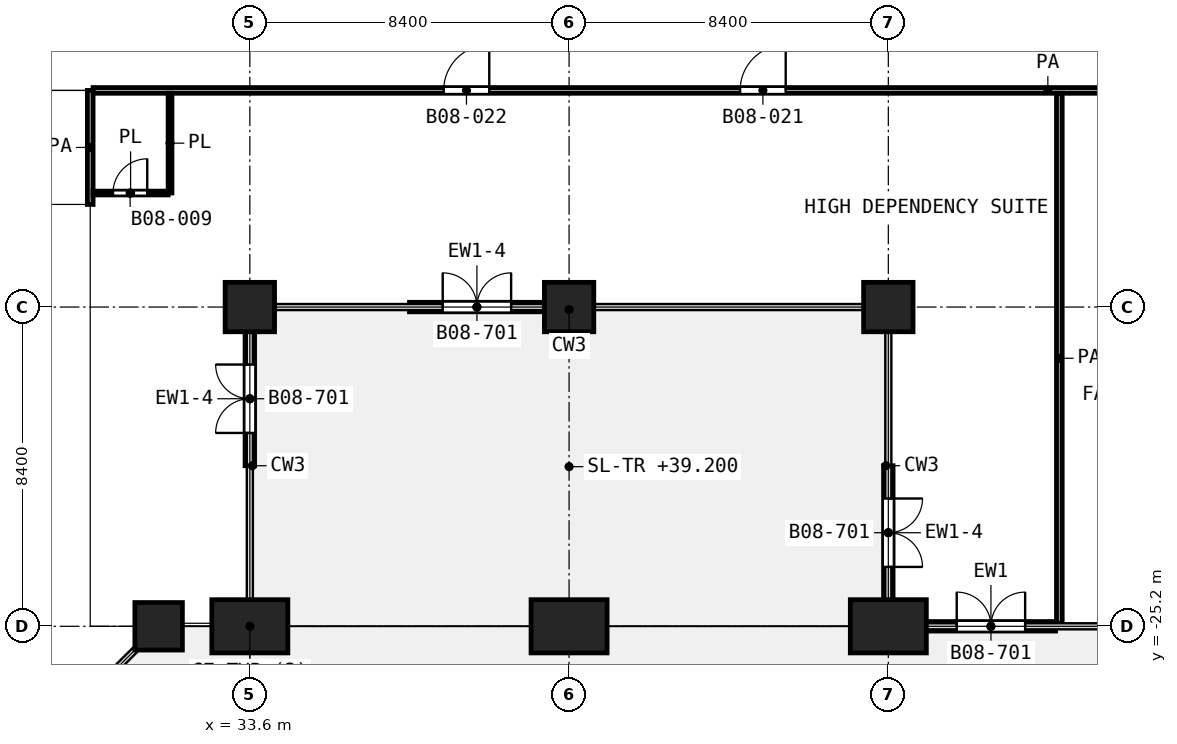
"""IFC4 building model, lengths in metres.
Left out: names, types, materials, properties, quantities, classifications, styles, units other than length and angle.
Written with IfcOpenShell. Run it as: python <this file> out.ifc"""

import sys

from ifc_helpers import new_model, si_unit, direction, frame, frame_2d, origin, origin_2d, place, context, subcontext, project, spatial, rectangle, extrude, element, fill, save


model = new_model("IFC4")
c1 = context("Model", 3, precision=1e-05, world=origin(), true_north=direction((0.0, 1.0)))
c2 = subcontext(c1, "Body", "Model", "MODEL_VIEW")
j1 = project(units=[si_unit("LENGTHUNIT", "METRE"), si_unit("PLANEANGLEUNIT", "RADIAN")], contexts=[c1])
p1 = place(None, origin())
s1 = spatial("IfcSite", under=j1, at=p1, CompositionType="ELEMENT")
p2 = place(p1, origin())
s2 = spatial("IfcBuilding", under=s1, at=p2, CompositionType="ELEMENT")
p3 = place(p2, frame((0.0, 0.0, 39.2)))
s3 = spatial("IfcBuildingStorey", under=s2, at=p3, CompositionType="ELEMENT", Elevation=39.2)
for number, where, z_axis, x_axis in (
    (1, (33.6, -16.8, 0.0), (0.0, 0.0, 1.0), (1.0, 0.0, 0.0)),
    (2, (42.0, -16.8, 0.0), (0.0, 0.0, 1.0), (1.0, 0.0, 0.0)),
    (3, (50.4, -16.8, 0.0), (0.0, 0.0, 1.0), (1.0, 0.0, 0.0)),
):
    element("IfcColumn", number, at=place(p3, frame(where, z_axis=z_axis, x_axis=x_axis)), inside=s3, PredefinedType="COLUMN", context=c2, shape_type="SweptSolid", body=[
        extrude(rectangle(XDim=1.3, YDim=1.3, at=origin_2d()), origin(), (0.0, 0.0, 1.0), 4.2),
    ])
p4 = place(p3, frame((31.2, -25.2, 0.0), z_axis=(0.0, 0.0, 1.0), x_axis=(1.0, 0.0, 0.0)))
e4 = element("IfcColumn", 4, at=p4, inside=s3, PredefinedType="COLUMN", context=c2, shape_type="SweptSolid", body=[
    extrude(rectangle(XDim=1.25, YDim=1.25, at=origin_2d()), origin(), (0.0, 0.0, 1.0), 4.2),
])
for number, where, z_axis, x_axis in (
    (5, (33.6, -25.2, 0.0), (0.0, 0.0, 1.0), (-1.0, 0.0, 0.0)),
    (6, (42.0, -25.2, 0.0), (0.0, 0.0, 1.0), (-1.0, 0.0, 0.0)),
    (7, (50.4, -25.2, 0.0), (0.0, 0.0, 1.0), (-1.0, 0.0, 0.0)),
):
    element("IfcColumn", number, at=place(p3, frame(where, z_axis=z_axis, x_axis=x_axis)), inside=s3, PredefinedType="COLUMN", context=c2, shape_type="SweptSolid", body=[
        extrude(rectangle(XDim=2.0, YDim=1.4, at=origin_2d()), origin(), (0.0, 0.0, 1.0), 4.2),
    ])
p5 = place(p3, frame((33.6, -20.975, 0.0), z_axis=(0.0, 0.0, 1.0), x_axis=(0.0, 1.0, 0.0)))
e8 = element("IfcWall", 8, at=p5, inside=s3, PredefinedType="SOLIDWALL", context=c2, shape_type="SweptSolid", body=[
    extrude(rectangle(XDim=3.525, YDim=0.25, at=frame_2d((1.763, 0.0))), origin(), (0.0, 0.0, 1.0), 3.76),
])
p6 = place(p5, frame((0.863, 0.0, 0.0)))
e9 = element("IfcOpeningElement", 9, at=p6, cuts=e8, PredefinedType="OPENING", context=c2, shape_type="SweptSolid", body=[
    extrude(rectangle(XDim=1.8, YDim=2.1, at=frame_2d((0.9, 1.05))), frame((0.0, 0.135, 0.0), z_axis=(0.0, -1.0, 0.0), x_axis=(1.0, 0.0, 0.0)), (0.0, 0.0, 1.0), 0.27),
])
p7 = place(p3, frame((37.8, -16.8, 0.0), z_axis=(0.0, 0.0, 1.0), x_axis=(1.0, 0.0, 0.0)))
e10 = element("IfcWall", 10, at=p7, inside=s3, PredefinedType="SOLIDWALL", context=c2, shape_type="SweptSolid", body=[
    extrude(rectangle(XDim=3.55, YDim=0.25, at=frame_2d((1.775, 0.0))), origin(), (0.0, 0.0, 1.0), 3.76),
])
p8 = place(p7, frame((0.875, 0.0, 0.0)))
e11 = element("IfcOpeningElement", 11, at=p8, cuts=e10, PredefinedType="OPENING", context=c2, shape_type="SweptSolid", body=[
    extrude(rectangle(XDim=1.8, YDim=2.1, at=frame_2d((0.9, 1.05))), frame((0.0, 0.135, 0.0), z_axis=(0.0, -1.0, 0.0), x_axis=(1.0, 0.0, 0.0)), (0.0, 0.0, 1.0), 0.27),
])
p9 = place(p3, frame((50.4, -20.975, 0.0), z_axis=(0.0, 0.0, 1.0), x_axis=(0.0, -1.0, 0.0)))
e12 = element("IfcWall", 12, at=p9, inside=s3, PredefinedType="SOLIDWALL", context=c2, shape_type="SweptSolid", body=[
    extrude(rectangle(XDim=3.525, YDim=0.25, at=frame_2d((1.762, 0.0))), origin(), (0.0, 0.0, 1.0), 3.76),
])
p10 = place(p9, frame((0.863, 0.0, 0.0)))
e13 = element("IfcOpeningElement", 13, at=p10, cuts=e12, PredefinedType="OPENING", context=c2, shape_type="SweptSolid", body=[
    extrude(rectangle(XDim=1.8, YDim=2.1, at=frame_2d((0.9, 1.05))), frame((0.0, 0.135, 0.0), z_axis=(0.0, -1.0, 0.0), x_axis=(1.0, 0.0, 0.0)), (0.0, 0.0, 1.0), 0.27),
])
p11 = place(p3, frame((51.4, -25.2, 0.0), z_axis=(0.0, 0.0, 1.0), x_axis=(1.0, 0.0, 0.0)))
e14 = element("IfcWall", 14, at=p11, inside=s3, PredefinedType="SOLIDWALL", context=c2, shape_type="SweptSolid", body=[
    extrude(rectangle(XDim=3.4, YDim=0.25, at=frame_2d((1.7, 0.0))), origin(), (0.0, 0.0, 1.0), 3.78),
])
p12 = place(p11, frame((0.8, 0.0, 0.0)))
e15 = element("IfcOpeningElement", 15, at=p12, cuts=e14, PredefinedType="OPENING", context=c2, shape_type="SweptSolid", body=[
    extrude(rectangle(XDim=1.8, YDim=2.1, at=frame_2d((0.9, 1.05))), frame((0.0, 0.135, 0.0), z_axis=(0.0, -1.0, 0.0), x_axis=(1.0, 0.0, 0.0)), (0.0, 0.0, 1.0), 0.27),
])
p13 = place(p3, frame((29.475, -13.8, 0.0), z_axis=(0.0, 0.0, 1.0), x_axis=(1.0, 0.0, 0.0)))
e16 = element("IfcWall", 16, at=p13, inside=s3, PredefinedType="PARTITIONING", context=c2, shape_type="SweptSolid", body=[
    extrude(rectangle(XDim=1.975, YDim=0.1, at=frame_2d((0.987, 0.0))), origin(), (0.0, 0.0, 1.0), 3.9),
])
p14 = place(p13, frame((0.525, 0.0, 0.0)))
e17 = element("IfcOpeningElement", 17, at=p14, cuts=e16, PredefinedType="OPENING", context=c2, shape_type="SweptSolid", body=[
    extrude(rectangle(XDim=0.9, YDim=2.1, at=frame_2d((0.45, 1.05))), frame((0.0, 0.06, 0.0), z_axis=(0.0, -1.0, 0.0), x_axis=(1.0, 0.0, 0.0)), (0.0, 0.0, 1.0), 0.12),
])
p15 = place(p3, frame((31.5, -13.8, 0.0), z_axis=(0.0, 0.0, 1.0), x_axis=(0.0, 1.0, 0.0)))
e18 = element("IfcWall", 18, at=p15, inside=s3, PredefinedType="PARTITIONING", context=c2, shape_type="SweptSolid", body=[
    extrude(rectangle(XDim=2.625, YDim=0.1, at=frame_2d((1.312, 0.0))), origin(), (0.0, 0.0, 1.0), 3.9),
])
p16 = place(p3, frame((29.475, -11.1, 0.0), z_axis=(0.0, 0.0, 1.0), x_axis=(1.0, 0.0, 0.0)))
e19 = element("IfcWall", 19, at=p16, inside=s3, PredefinedType="PARTITIONING", context=c2, shape_type="SweptSolid", body=[
    extrude(rectangle(XDim=50.245, YDim=0.15, at=frame_2d((25.123, 0.0))), origin(), (0.0, 0.0, 1.0), 3.9),
])
p17 = place(p16, frame((17.025, 0.0, 0.0)))
e20 = element("IfcOpeningElement", 20, at=p17, cuts=e19, PredefinedType="OPENING", context=c2, shape_type="SweptSolid", body=[
    extrude(rectangle(XDim=1.2, YDim=2.1, at=frame_2d((0.6, 1.05))), frame((0.0, 0.085, 0.0), z_axis=(0.0, -1.0, 0.0), x_axis=(1.0, 0.0, 0.0)), (0.0, 0.0, 1.0), 0.17),
])
p18 = place(p16, frame((9.225, 0.0, 0.0)))
e21 = element("IfcOpeningElement", 21, at=p18, cuts=e19, PredefinedType="OPENING", context=c2, shape_type="SweptSolid", body=[
    extrude(rectangle(XDim=1.2, YDim=2.1, at=frame_2d((0.6, 1.05))), frame((0.0, 0.085, 0.0), z_axis=(0.0, -1.0, 0.0), x_axis=(1.0, 0.0, 0.0)), (0.0, 0.0, 1.0), 0.17),
])
p19 = place(p16, frame((28.425, 0.0, 0.0)))
e22 = element("IfcOpeningElement", 22, at=p19, cuts=e19, PredefinedType="OPENING", context=c2, shape_type="SweptSolid", body=[
    extrude(rectangle(XDim=1.5, YDim=2.1, at=frame_2d((0.75, 1.05))), frame((0.0, 0.085, 0.0), z_axis=(0.0, -1.0, 0.0), x_axis=(1.0, 0.0, 0.0)), (0.0, 0.0, 1.0), 0.17),
])
p20 = place(p16, frame((36.675, 0.0, 0.0)))
e23 = element("IfcOpeningElement", 23, at=p20, cuts=e19, PredefinedType="OPENING", context=c2, shape_type="SweptSolid", body=[
    extrude(rectangle(XDim=1.5, YDim=2.1, at=frame_2d((0.75, 1.05))), frame((0.0, 0.085, 0.0), z_axis=(0.0, -1.0, 0.0), x_axis=(1.0, 0.0, 0.0)), (0.0, 0.0, 1.0), 0.17),
])
p21 = place(p16, frame((45.375, 0.0, 0.0)))
e24 = element("IfcOpeningElement", 24, at=p21, cuts=e19, PredefinedType="OPENING", context=c2, shape_type="SweptSolid", body=[
    extrude(rectangle(XDim=1.5, YDim=2.1, at=frame_2d((0.75, 1.05))), frame((0.0, 0.085, 0.0), z_axis=(0.0, -1.0, 0.0), x_axis=(1.0, 0.0, 0.0)), (0.0, 0.0, 1.0), 0.17),
])
p22 = place(p3, frame((29.4, -14.1, 0.0), z_axis=(0.0, 0.0, 1.0), x_axis=(0.0, 1.0, 0.0)))
e25 = element("IfcWall", 25, at=p22, inside=s3, PredefinedType="PARTITIONING", context=c2, shape_type="SweptSolid", body=[
    extrude(rectangle(XDim=3.0, YDim=0.15, at=frame_2d((1.5, 0.0))), origin(), (0.0, 0.0, 1.0), 3.9),
])
p23 = place(p3, frame((54.9, -25.12, 0.0), z_axis=(0.0, 0.0, 1.0), x_axis=(0.0, 1.0, 0.0)))
e26 = element("IfcWall", 26, at=p23, inside=s3, PredefinedType="PARTITIONING", context=c2, shape_type="SweptSolid", body=[
    extrude(rectangle(XDim=13.945, YDim=0.15, at=frame_2d((6.973, 0.0))), origin(), (0.0, 0.0, 1.0), 3.9),
])
p24 = place(p6, origin())
e27 = element("IfcDoor", 27, at=p24, inside=s3, OperationType="DOUBLE_DOOR_SINGLE_SWING", PredefinedType="DOOR", context=c2, shape_type="SweptSolid", body=[
    extrude(rectangle(XDim=1.8, YDim=2.1, at=frame_2d((0.9, 1.05))), frame((0.0, 0.025, 0.0), z_axis=(0.0, -1.0, 0.0), x_axis=(1.0, 0.0, 0.0)), (0.0, 0.0, 1.0), 0.05),
])
fill(e9, e27)
p25 = place(p8, origin())
e28 = element("IfcDoor", 28, at=p25, inside=s3, OperationType="DOUBLE_DOOR_SINGLE_SWING", PredefinedType="DOOR", context=c2, shape_type="SweptSolid", body=[
    extrude(rectangle(XDim=1.8, YDim=2.1, at=frame_2d((0.9, 1.05))), frame((0.0, 0.025, 0.0), z_axis=(0.0, -1.0, 0.0), x_axis=(1.0, 0.0, 0.0)), (0.0, 0.0, 1.0), 0.05),
])
fill(e11, e28)
p26 = place(p10, origin())
e29 = element("IfcDoor", 29, at=p26, inside=s3, OperationType="DOUBLE_DOOR_SINGLE_SWING", PredefinedType="DOOR", context=c2, shape_type="SweptSolid", body=[
    extrude(rectangle(XDim=1.8, YDim=2.1, at=frame_2d((0.9, 1.05))), frame((0.0, 0.025, 0.0), z_axis=(0.0, -1.0, 0.0), x_axis=(1.0, 0.0, 0.0)), (0.0, 0.0, 1.0), 0.05),
])
fill(e13, e29)
p27 = place(p12, origin())
e30 = element("IfcDoor", 30, at=p27, inside=s3, OperationType="DOUBLE_DOOR_SINGLE_SWING", PredefinedType="DOOR", context=c2, shape_type="SweptSolid", body=[
    extrude(rectangle(XDim=1.8, YDim=2.1, at=frame_2d((0.9, 1.05))), frame((0.0, 0.025, 0.0), z_axis=(0.0, -1.0, 0.0), x_axis=(1.0, 0.0, 0.0)), (0.0, 0.0, 1.0), 0.05),
])
fill(e15, e30)
p28 = place(p17, origin())
e31 = element("IfcDoor", 31, at=p28, inside=s3, OperationType="SINGLE_SWING_RIGHT", PredefinedType="DOOR", context=c2, shape_type="SweptSolid", body=[
    extrude(rectangle(XDim=1.2, YDim=2.1, at=frame_2d((0.6, 1.05))), frame((0.0, 0.025, 0.0), z_axis=(0.0, -1.0, 0.0), x_axis=(1.0, 0.0, 0.0)), (0.0, 0.0, 1.0), 0.05),
])
fill(e20, e31)
p29 = place(p18, origin())
e32 = element("IfcDoor", 32, at=p29, inside=s3, OperationType="SINGLE_SWING_RIGHT", PredefinedType="DOOR", context=c2, shape_type="SweptSolid", body=[
    extrude(rectangle(XDim=1.2, YDim=2.1, at=frame_2d((0.6, 1.05))), frame((0.0, 0.025, 0.0), z_axis=(0.0, -1.0, 0.0), x_axis=(1.0, 0.0, 0.0)), (0.0, 0.0, 1.0), 0.05),
])
fill(e21, e32)
p30 = place(p14, origin())
e33 = element("IfcDoor", 33, at=p30, inside=s3, OperationType="SINGLE_SWING_RIGHT", PredefinedType="DOOR", context=c2, shape_type="SweptSolid", body=[
    extrude(rectangle(XDim=0.9, YDim=2.1, at=frame_2d((0.45, 1.05))), frame((0.0, 0.025, 0.0), z_axis=(0.0, -1.0, 0.0), x_axis=(1.0, 0.0, 0.0)), (0.0, 0.0, 1.0), 0.05),
])
fill(e17, e33)
save(model, sys.argv[1])
